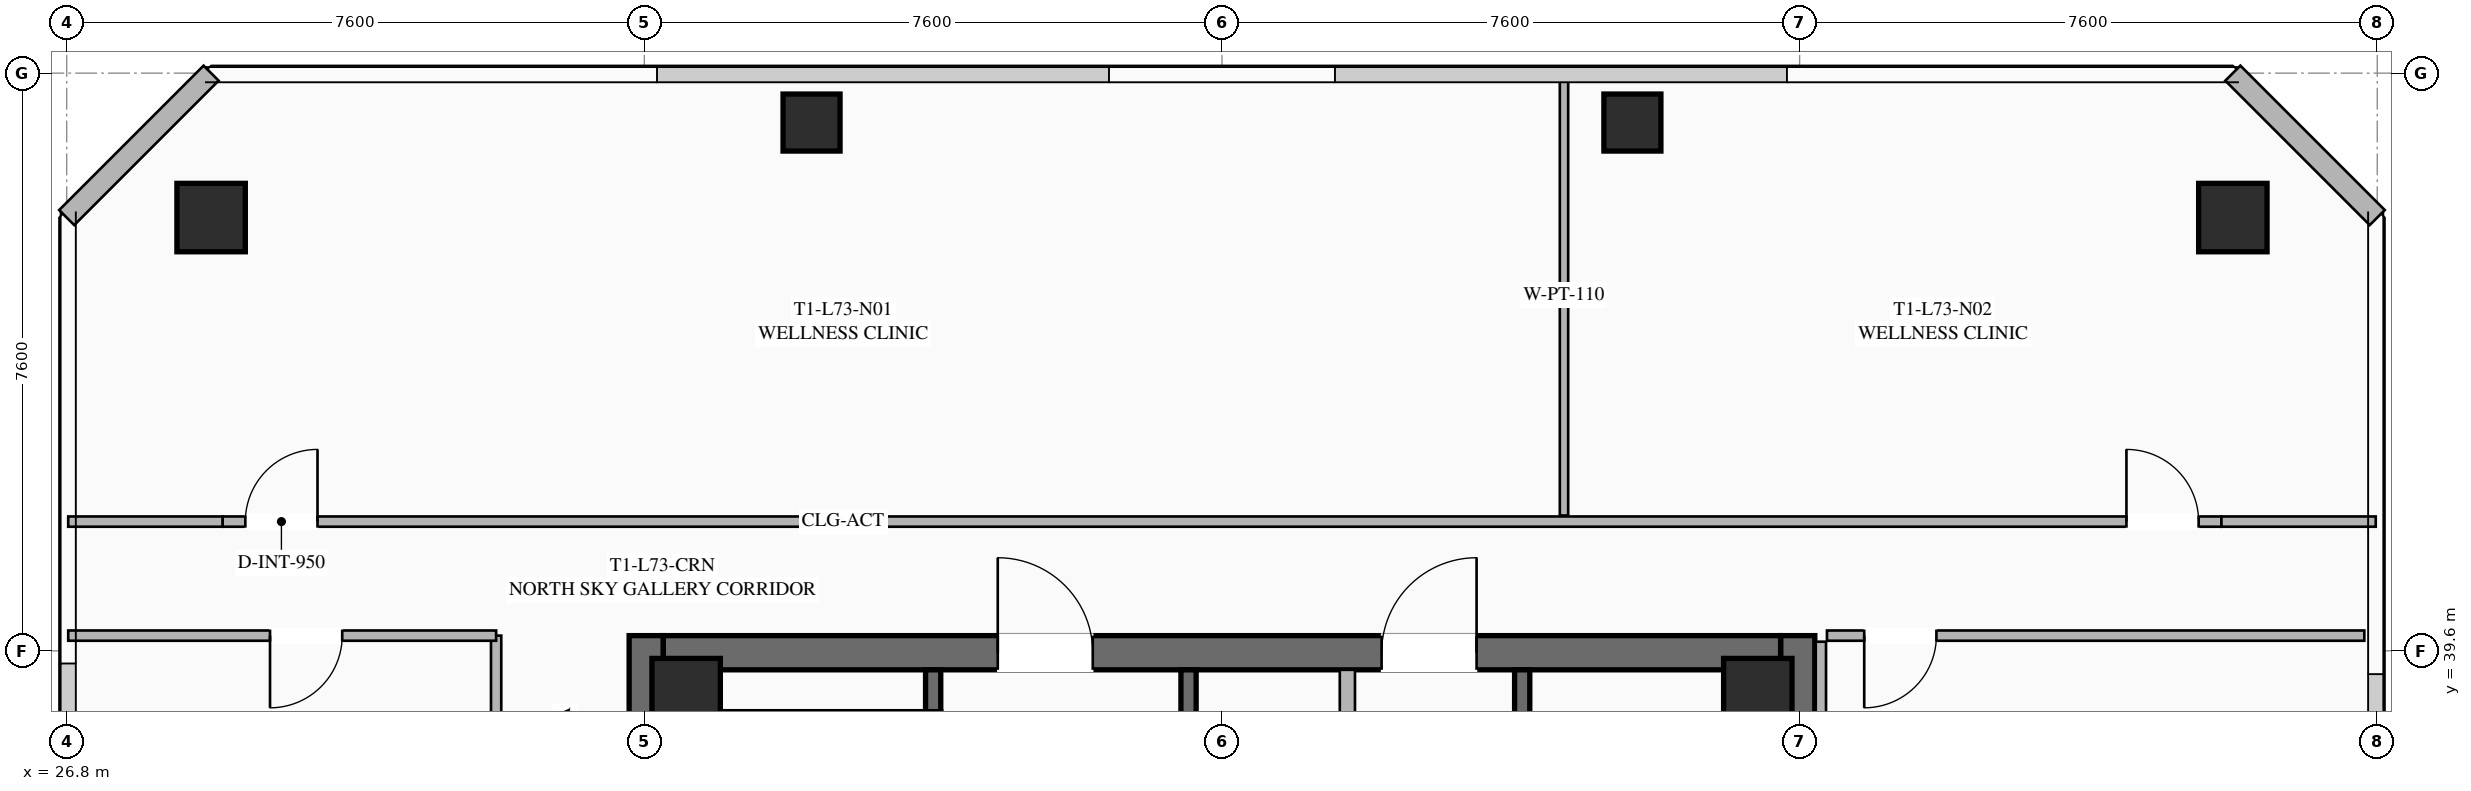
"""IFC4 building model, lengths in metres.
Left out: names, types, materials, properties, quantities, classifications, styles, units other than length and angle.
Written with IfcOpenShell. Run it as: python <this file> out.ifc"""

import sys

from ifc_helpers import new_model, si_unit, direction, frame, frame_2d, origin, origin_2d, place, context, subcontext, project, spatial, rectangle, hollow_rectangle, extrude, element, fill, save


model = new_model("IFC4")
c1 = context("Model", 3, precision=1e-05, world=origin(), true_north=direction((0.0, 1.0)))
c2 = subcontext(c1, "Body", "Model", "MODEL_VIEW")
j1 = project(units=[si_unit("LENGTHUNIT", "METRE"), si_unit("PLANEANGLEUNIT", "RADIAN")], contexts=[c1])
p1 = place(None, origin())
s1 = spatial("IfcSite", under=j1, at=p1, CompositionType="ELEMENT")
p2 = place(p1, origin())
s2 = spatial("IfcBuilding", under=s1, at=p2, CompositionType="ELEMENT")
p3 = place(p2, frame((0.0, 0.0, 270.5)))
s3 = spatial("IfcBuildingStorey", under=s2, at=p3, CompositionType="ELEMENT", Elevation=270.5)
for number, where, z_axis, x_axis in (
    (1, (34.425, 24.2, 0.0), (0.0, 0.0, 1.0), (0.0, 1.0, 0.0)),
    (2, (49.575, 39.8, 0.0), (0.0, 0.0, 1.0), (0.0, -1.0, 0.0)),
):
    element("IfcWall", number, at=place(p3, frame(where, z_axis=z_axis, x_axis=x_axis)), inside=s3, PredefinedType="SHEAR", context=c2, shape_type="SweptSolid", body=[
        extrude(rectangle(XDim=15.6, YDim=0.45, at=frame_2d((7.8, 0.0))), origin(), (0.0, 0.0, 1.0), 3.55),
    ])
p4 = place(p3, frame((34.65, 39.575, 0.0), z_axis=(0.0, 0.0, 1.0), x_axis=(1.0, 0.0, 0.0)))
e3 = element("IfcWall", 3, at=p4, inside=s3, PredefinedType="SHEAR", context=c2, shape_type="SweptSolid", body=[
    extrude(rectangle(XDim=14.7, YDim=0.45, at=frame_2d((7.35, 0.0))), origin(), (0.0, 0.0, 1.0), 3.55),
])
p5 = place(p4, frame((4.4, 0.0, 0.0)))
e4 = element("IfcOpeningElement", 4, at=p5, cuts=e3, PredefinedType="OPENING", context=c2, shape_type="SweptSolid", body=[
    extrude(rectangle(XDim=1.25, YDim=2.25, at=frame_2d((0.625, 1.125))), frame((0.0, 0.235, 0.0), z_axis=(0.0, -1.0, 0.0), x_axis=(1.0, 0.0, 0.0)), (0.0, 0.0, 1.0), 0.47),
])
p6 = place(p4, frame((9.45, 0.0, 0.0)))
e5 = element("IfcOpeningElement", 5, at=p6, cuts=e3, PredefinedType="OPENING", context=c2, shape_type="SweptSolid", body=[
    extrude(rectangle(XDim=1.25, YDim=2.25, at=frame_2d((0.625, 1.125))), frame((0.0, 0.235, 0.0), z_axis=(0.0, -1.0, 0.0), x_axis=(1.0, 0.0, 0.0)), (0.0, 0.0, 1.0), 0.47),
])
for number, where, z_axis, x_axis in (
    (6, (49.05, 39.05, 0.0), (0.0, 0.0, 1.0), (1.0, 0.0, 0.0)),
    (7, (34.95, 39.05, 0.0), (0.0, 0.0, 1.0), (1.0, 0.0, 0.0)),
    (8, (55.3, 45.3, 0.0), (0.0, 0.0, 1.0), (1.0, 0.0, 0.0)),
    (9, (28.7, 45.3, 0.0), (0.0, 0.0, 1.0), (1.0, 0.0, 0.0)),
):
    element("IfcColumn", number, at=place(p3, frame(where, z_axis=z_axis, x_axis=x_axis)), inside=s3, PredefinedType="COLUMN", context=c2, shape_type="SweptSolid", body=[
        extrude(hollow_rectangle(XDim=0.9, YDim=0.9, WallThickness=0.04, at=origin_2d()), origin(), (0.0, 0.0, 1.0), 3.37),
    ])
for number, where, z_axis, x_axis in (
    (10, (47.4, 46.55, 0.0), (0.0, 0.0, 1.0), (1.0, 0.0, 0.0)),
    (11, (36.6, 46.55, 0.0), (0.0, 0.0, 1.0), (1.0, 0.0, 0.0)),
):
    element("IfcColumn", number, at=place(p3, frame(where, z_axis=z_axis, x_axis=x_axis)), inside=s3, PredefinedType="COLUMN", context=c2, shape_type="SweptSolid", body=[
        extrude(hollow_rectangle(XDim=0.75, YDim=0.75, WallThickness=0.032, at=origin_2d()), origin(), (0.0, 0.0, 1.0), 3.37),
    ])
for number, where, z_axis, x_axis in (
    (12, (26.8, 45.3, 0.0), (0.0, 0.0, 1.0), (0.707, 0.707, 0.0)),
    (13, (55.3, 47.2, 0.0), (0.0, 0.0, 1.0), (0.707, -0.707, 0.0)),
):
    element("IfcWall", number, at=place(p3, frame(where, z_axis=z_axis, x_axis=x_axis)), inside=s3, PredefinedType="SOLIDWALL", context=c2, shape_type="SweptSolid", body=[
        extrude(rectangle(XDim=2.687, YDim=0.28, at=frame_2d((1.343, 0.0))), origin(), (0.0, 0.0, 1.0), 3.37),
    ])
p7 = place(p3, frame((38.2, 31.2, 0.0), z_axis=(0.0, 0.0, 1.0), x_axis=(0.0, 1.0, 0.0)))
e14 = element("IfcWall", 14, at=p7, inside=s3, PredefinedType="SHEAR", context=c2, shape_type="SweptSolid", body=[
    extrude(rectangle(XDim=8.15, YDim=0.2, at=frame_2d((4.075, 0.0))), origin(), (0.0, 0.0, 1.0), 3.37),
])
p8 = place(p7, frame((0.45, 0.0, 0.0)))
e15 = element("IfcOpeningElement", 15, at=p8, cuts=e14, PredefinedType="OPENING", context=c2, shape_type="SweptSolid", body=[
    extrude(rectangle(XDim=1.15, YDim=2.2, at=frame_2d((0.575, 1.1))), frame((0.0, 0.11, 0.0), z_axis=(0.0, -1.0, 0.0), x_axis=(1.0, 0.0, 0.0)), (0.0, 0.0, 1.0), 0.22),
])
p9 = place(p3, frame((41.56, 24.65, 0.0), z_axis=(0.0, 0.0, 1.0), x_axis=(0.0, 1.0, 0.0)))
e16 = element("IfcWall", 16, at=p9, inside=s3, PredefinedType="SHEAR", context=c2, shape_type="SweptSolid", body=[
    extrude(rectangle(XDim=14.7, YDim=0.2, at=frame_2d((7.35, 0.0))), origin(), (0.0, 0.0, 1.0), 3.37),
])
p10 = place(p3, frame((45.95, 39.35, 0.0), z_axis=(0.0, 0.0, 1.0), x_axis=(0.0, -1.0, 0.0)))
e17 = element("IfcWall", 17, at=p10, inside=s3, PredefinedType="SHEAR", context=c2, shape_type="SweptSolid", body=[
    extrude(rectangle(XDim=6.55, YDim=0.2, at=frame_2d((3.275, 0.0))), origin(), (0.0, 0.0, 1.0), 3.37),
])
p11 = place(p10, frame((5.075, 0.0, 0.0)))
e18 = element("IfcOpeningElement", 18, at=p11, cuts=e17, PredefinedType="OPENING", context=c2, shape_type="SweptSolid", body=[
    extrude(rectangle(XDim=1.1, YDim=2.2, at=frame_2d((0.55, 1.1))), frame((0.0, 0.11, 0.0), z_axis=(0.0, -1.0, 0.0), x_axis=(1.0, 0.0, 0.0)), (0.0, 0.0, 1.0), 0.22),
])
p12 = place(p10, frame((3.025, 0.0, 0.0)))
e19 = element("IfcOpeningElement", 19, at=p12, cuts=e17, PredefinedType="OPENING", context=c2, shape_type="SweptSolid", body=[
    extrude(rectangle(XDim=1.1, YDim=2.2, at=frame_2d((0.55, 1.1))), frame((0.0, 0.11, 0.0), z_axis=(0.0, -1.0, 0.0), x_axis=(1.0, 0.0, 0.0)), (0.0, 0.0, 1.0), 0.22),
])
p13 = place(p10, frame((1.025, 0.0, 0.0)))
e20 = element("IfcOpeningElement", 20, at=p13, cuts=e17, PredefinedType="OPENING", context=c2, shape_type="SweptSolid", body=[
    extrude(rectangle(XDim=1.1, YDim=2.2, at=frame_2d((0.55, 1.1))), frame((0.0, 0.11, 0.0), z_axis=(0.0, -1.0, 0.0), x_axis=(1.0, 0.0, 0.0)), (0.0, 0.0, 1.0), 0.22),
])
p14 = place(p3, frame((43.65, 32.35, 0.0), z_axis=(0.0, 0.0, 1.0), x_axis=(0.0, 1.0, 0.0)))
e21 = element("IfcWall", 21, at=p14, inside=s3, PredefinedType="SOLIDWALL", context=c2, shape_type="SweptSolid", body=[
    extrude(rectangle(XDim=7.0, YDim=0.2, at=frame_2d((3.5, 0.0))), origin(), (0.0, 0.0, 1.0), 2.723),
])
p15 = place(p14, frame((0.85, 0.0, 0.0)))
e22 = element("IfcOpeningElement", 22, at=p15, cuts=e21, PredefinedType="OPENING", context=c2, shape_type="SweptSolid", body=[
    extrude(rectangle(XDim=0.95, YDim=2.05, at=frame_2d((0.475, 1.025))), frame((0.0, 0.11, 0.0), z_axis=(0.0, -1.0, 0.0), x_axis=(1.0, 0.0, 0.0)), (0.0, 0.0, 1.0), 0.22),
])
p16 = place(p14, frame((4.85, 0.0, 0.0)))
e23 = element("IfcOpeningElement", 23, at=p16, cuts=e21, PredefinedType="OPENING", context=c2, shape_type="SweptSolid", body=[
    extrude(rectangle(XDim=0.95, YDim=2.05, at=frame_2d((0.475, 1.025))), frame((0.0, 0.11, 0.0), z_axis=(0.0, -1.0, 0.0), x_axis=(1.0, 0.0, 0.0)), (0.0, 0.0, 1.0), 0.22),
])
p17 = place(p3, frame((32.45, 35.4, 0.0), z_axis=(0.0, 0.0, 1.0), x_axis=(0.0, 1.0, 0.0)))
e24 = element("IfcWall", 24, at=p17, inside=s3, PredefinedType="PARTITIONING", context=c2, shape_type="SweptSolid", body=[
    extrude(rectangle(XDim=4.4, YDim=0.135, at=frame_2d((2.2, 0.0))), origin(), (0.0, 0.0, 1.0), 2.723),
])
p18 = place(p3, frame((28.85, 41.3, 0.0), z_axis=(0.0, 0.0, 1.0), x_axis=(1.0, 0.0, 0.0)))
e25 = element("IfcWall", 25, at=p18, inside=s3, PredefinedType="PARTITIONING", context=c2, shape_type="SweptSolid", body=[
    extrude(rectangle(XDim=26.3, YDim=0.135, at=frame_2d((13.15, 0.0))), origin(), (0.0, 0.0, 1.0), 2.723),
])
p19 = place(p18, frame((0.3, 0.0, 0.0)))
e26 = element("IfcOpeningElement", 26, at=p19, cuts=e25, PredefinedType="OPENING", context=c2, shape_type="SweptSolid", body=[
    extrude(rectangle(XDim=0.95, YDim=2.05, at=frame_2d((0.475, 1.025))), frame((0.0, 0.077, 0.0), z_axis=(0.0, -1.0, 0.0), x_axis=(1.0, 0.0, 0.0)), (0.0, 0.0, 1.0), 0.155),
])
p20 = place(p18, frame((25.05, 0.0, 0.0)))
e27 = element("IfcOpeningElement", 27, at=p20, cuts=e25, PredefinedType="OPENING", context=c2, shape_type="SweptSolid", body=[
    extrude(rectangle(XDim=0.95, YDim=2.05, at=frame_2d((0.475, 1.025))), frame((0.0, 0.077, 0.0), z_axis=(0.0, -1.0, 0.0), x_axis=(1.0, 0.0, 0.0)), (0.0, 0.0, 1.0), 0.155),
])
for number, where, z_axis, x_axis in (
    (28, (26.82, 41.3, 0.0), (0.0, 0.0, 1.0), (1.0, 0.0, 0.0)),
    (29, (55.15, 41.3, 0.0), (0.0, 0.0, 1.0), (1.0, 0.0, 0.0)),
):
    element("IfcWall", number, at=place(p3, frame(where, z_axis=z_axis, x_axis=x_axis)), inside=s3, PredefinedType="PARTITIONING", context=c2, shape_type="SweptSolid", body=[
        extrude(rectangle(XDim=2.03, YDim=0.135, at=frame_2d((1.015, 0.0))), origin(), (0.0, 0.0, 1.0), 2.723),
    ])
p21 = place(p3, frame((46.5, 41.38, 0.0), z_axis=(0.0, 0.0, 1.0), x_axis=(0.0, 1.0, 0.0)))
e30 = element("IfcWall", 30, at=p21, inside=s3, PredefinedType="PARTITIONING", context=c2, shape_type="SweptSolid", body=[
    extrude(rectangle(XDim=5.8, YDim=0.11, at=frame_2d((2.9, 0.0))), origin(), (0.0, 0.0, 1.0), 2.723),
])
p22 = place(p3, frame((49.88, 39.72, 0.0), z_axis=(0.0, 0.0, 1.0), x_axis=(0.0, -1.0, 0.0)))
e31 = element("IfcWall", 31, at=p22, inside=s3, PredefinedType="PARTITIONING", context=c2, shape_type="SweptSolid", body=[
    extrude(rectangle(XDim=15.44, YDim=0.135, at=frame_2d((7.72, 0.0))), origin(), (0.0, 0.0, 1.0), 2.723),
])
p23 = place(p3, frame((57.03, 39.8, 0.0), z_axis=(0.0, 0.0, 1.0), x_axis=(-1.0, 0.0, 0.0)))
e32 = element("IfcWall", 32, at=p23, inside=s3, PredefinedType="PARTITIONING", context=c2, shape_type="SweptSolid", body=[
    extrude(rectangle(XDim=7.07, YDim=0.135, at=frame_2d((3.535, 0.0))), origin(), (0.0, 0.0, 1.0), 2.723),
])
p24 = place(p23, frame((5.63, 0.0, 0.0)))
e33 = element("IfcOpeningElement", 33, at=p24, cuts=e32, PredefinedType="OPENING", context=c2, shape_type="SweptSolid", body=[
    extrude(rectangle(XDim=0.95, YDim=2.05, at=frame_2d((0.475, 1.025))), frame((0.0, 0.077, 0.0), z_axis=(0.0, -1.0, 0.0), x_axis=(1.0, 0.0, 0.0)), (0.0, 0.0, 1.0), 0.155),
])
p25 = place(p3, frame((32.45, 39.8, 0.0), z_axis=(0.0, 0.0, 1.0), x_axis=(-1.0, 0.0, 0.0)))
e34 = element("IfcWall", 34, at=p25, inside=s3, PredefinedType="PARTITIONING", context=c2, shape_type="SweptSolid", body=[
    extrude(rectangle(XDim=5.63, YDim=0.135, at=frame_2d((2.815, 0.0))), origin(), (0.0, 0.0, 1.0), 2.723),
])
p26 = place(p25, frame((2.025, 0.0, 0.0)))
e35 = element("IfcOpeningElement", 35, at=p26, cuts=e34, PredefinedType="OPENING", context=c2, shape_type="SweptSolid", body=[
    extrude(rectangle(XDim=0.95, YDim=2.05, at=frame_2d((0.475, 1.025))), frame((0.0, 0.077, 0.0), z_axis=(0.0, -1.0, 0.0), x_axis=(1.0, 0.0, 0.0)), (0.0, 0.0, 1.0), 0.155),
])
p27 = place(p5, origin())
e36 = element("IfcDoor", 36, at=p27, inside=s3, OperationType="SINGLE_SWING_LEFT", PredefinedType="DOOR", context=c2, shape_type="SweptSolid", body=[
    extrude(rectangle(XDim=1.25, YDim=2.25, at=frame_2d((0.625, 1.125))), frame((0.0, 0.025, 0.0), z_axis=(0.0, -1.0, 0.0), x_axis=(1.0, 0.0, 0.0)), (0.0, 0.0, 1.0), 0.05),
])
fill(e4, e36)
p28 = place(p6, origin())
e37 = element("IfcDoor", 37, at=p28, inside=s3, OperationType="SINGLE_SWING_RIGHT", PredefinedType="DOOR", context=c2, shape_type="SweptSolid", body=[
    extrude(rectangle(XDim=1.25, YDim=2.25, at=frame_2d((0.625, 1.125))), frame((0.0, 0.025, 0.0), z_axis=(0.0, -1.0, 0.0), x_axis=(1.0, 0.0, 0.0)), (0.0, 0.0, 1.0), 0.05),
])
fill(e5, e37)
p29 = place(p19, origin())
e38 = element("IfcDoor", 38, at=p29, inside=s3, OperationType="SINGLE_SWING_RIGHT", PredefinedType="DOOR", context=c2, shape_type="SweptSolid", body=[
    extrude(rectangle(XDim=0.95, YDim=2.05, at=frame_2d((0.475, 1.025))), frame((0.0, 0.025, 0.0), z_axis=(0.0, -1.0, 0.0), x_axis=(1.0, 0.0, 0.0)), (0.0, 0.0, 1.0), 0.05),
])
fill(e26, e38)
p30 = place(p20, origin())
e39 = element("IfcDoor", 39, at=p30, inside=s3, OperationType="SINGLE_SWING_LEFT", PredefinedType="DOOR", context=c2, shape_type="SweptSolid", body=[
    extrude(rectangle(XDim=0.95, YDim=2.05, at=frame_2d((0.475, 1.025))), frame((0.0, 0.025, 0.0), z_axis=(0.0, -1.0, 0.0), x_axis=(1.0, 0.0, 0.0)), (0.0, 0.0, 1.0), 0.05),
])
fill(e27, e39)
p31 = place(p24, origin())
e40 = element("IfcDoor", 40, at=p31, inside=s3, OperationType="SINGLE_SWING_RIGHT", PredefinedType="DOOR", context=c2, shape_type="SweptSolid", body=[
    extrude(rectangle(XDim=0.95, YDim=2.05, at=frame_2d((0.475, 1.025))), frame((0.0, 0.025, 0.0), z_axis=(0.0, -1.0, 0.0), x_axis=(1.0, 0.0, 0.0)), (0.0, 0.0, 1.0), 0.05),
])
fill(e33, e40)
p32 = place(p26, origin())
e41 = element("IfcDoor", 41, at=p32, inside=s3, OperationType="SINGLE_SWING_RIGHT", PredefinedType="DOOR", context=c2, shape_type="SweptSolid", body=[
    extrude(rectangle(XDim=0.95, YDim=2.05, at=frame_2d((0.475, 1.025))), frame((0.0, 0.025, 0.0), z_axis=(0.0, -1.0, 0.0), x_axis=(1.0, 0.0, 0.0)), (0.0, 0.0, 1.0), 0.05),
])
fill(e35, e41)
save(model, sys.argv[1])
